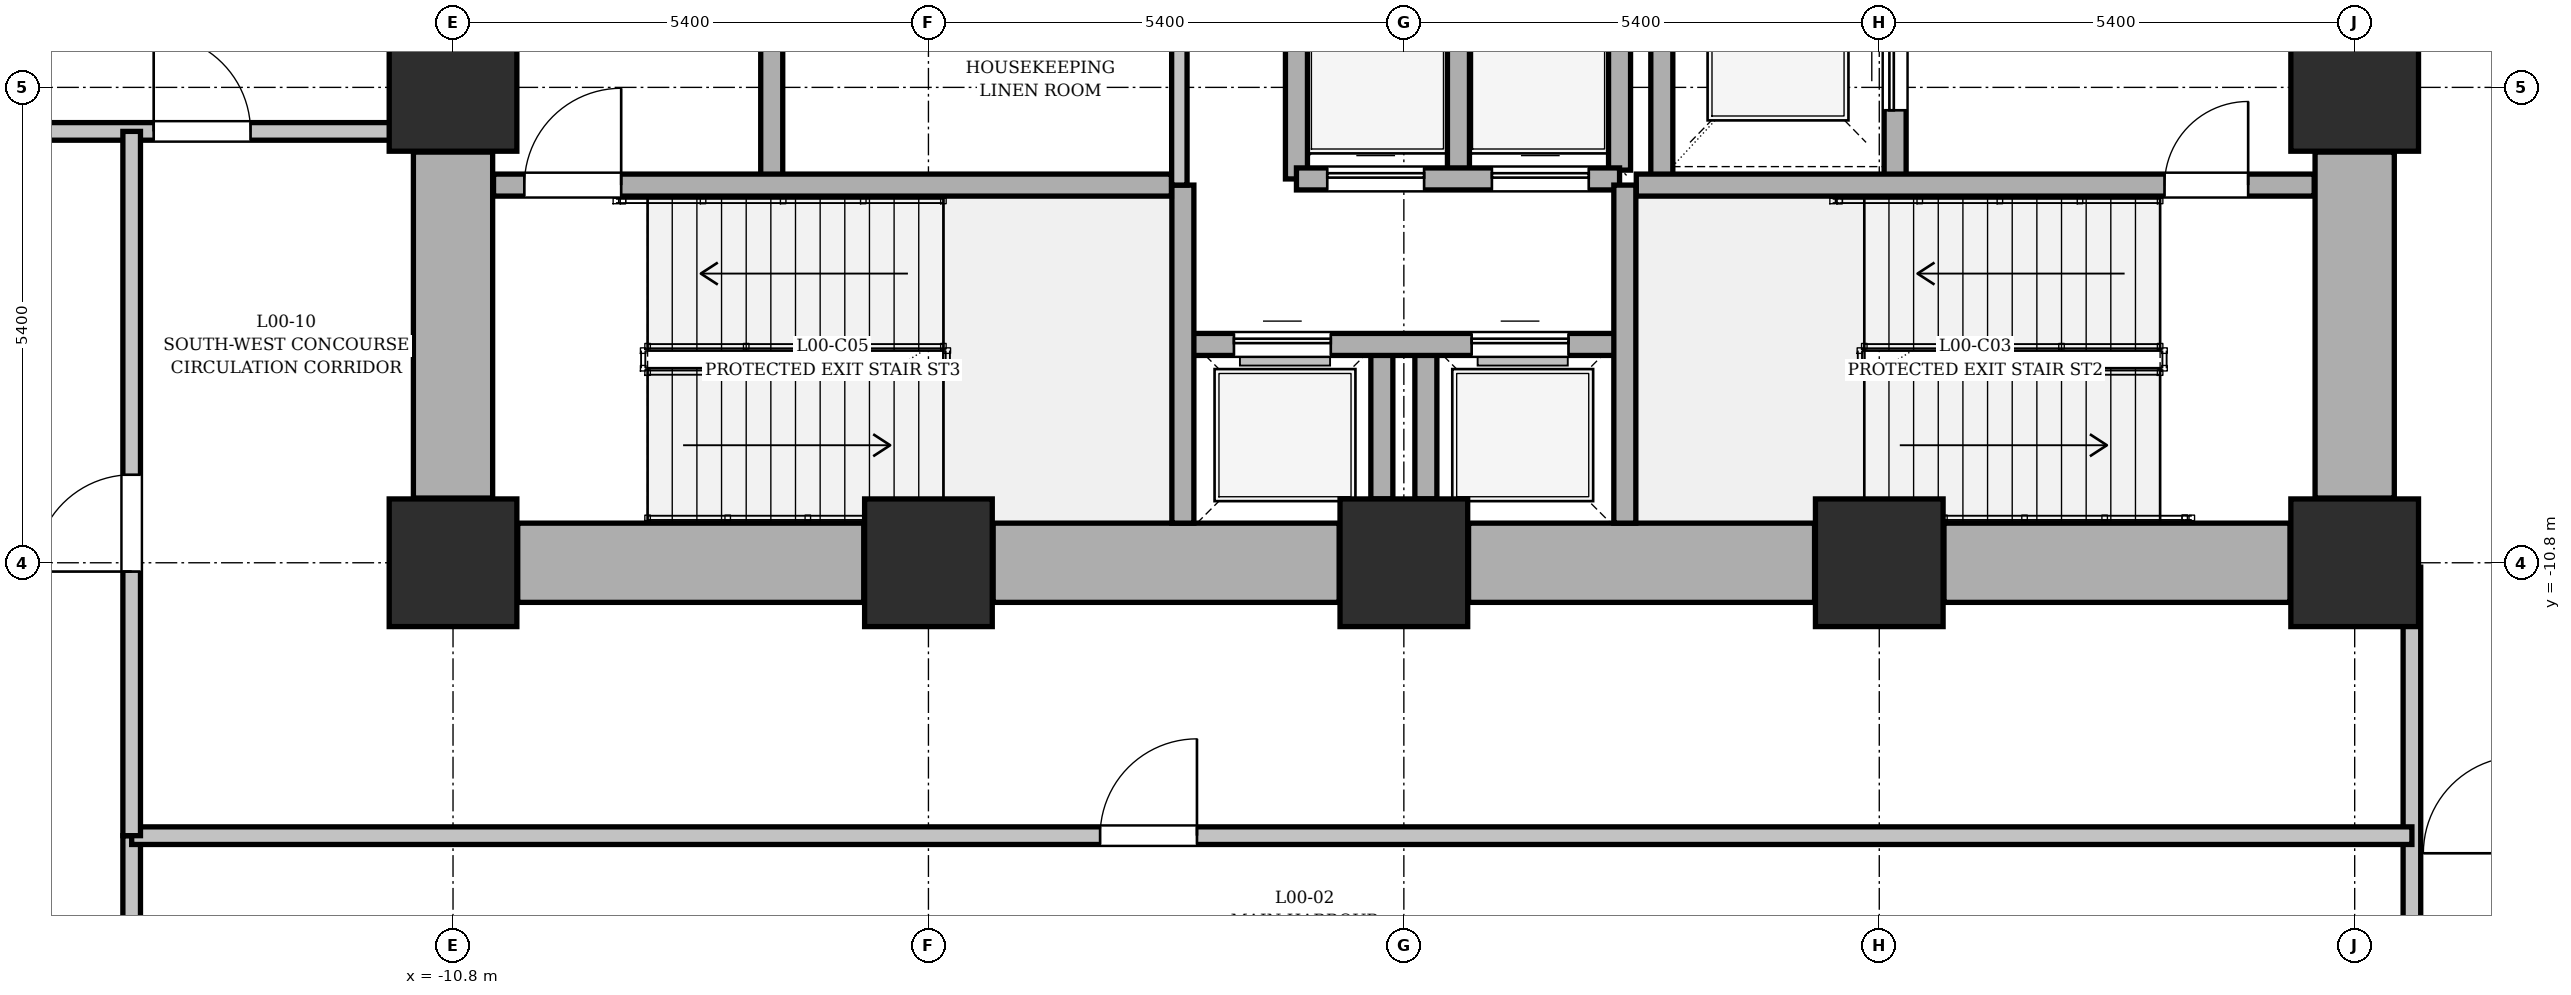
"""IFC4 building model, lengths in metres.
Left out: names, types, materials, properties, quantities, classifications, styles, units other than length and angle.
Written with IfcOpenShell. Run it as: python <this file> out.ifc"""

import sys

from ifc_helpers import new_model, si_unit, direction, frame, frame_2d, origin, origin_2d, place, context, subcontext, project, spatial, rectangle, extrude, element, fill, save


model = new_model("IFC4")
c1 = context("Model", 3, precision=1e-05, world=origin(), true_north=direction((0.0, 1.0)))
c2 = subcontext(c1, "Body", "Model", "MODEL_VIEW")
j1 = project(units=[si_unit("LENGTHUNIT", "METRE"), si_unit("PLANEANGLEUNIT", "RADIAN")], contexts=[c1])
p1 = place(None, origin())
s1 = spatial("IfcSite", under=j1, at=p1, CompositionType="ELEMENT")
p2 = place(p1, origin())
s2 = spatial("IfcBuilding", under=s1, at=p2, CompositionType="ELEMENT")
p3 = place(p2, origin())
s3 = spatial("IfcBuildingStorey", under=s2, at=p3, CompositionType="ELEMENT", Elevation=0.0)
for number, where, z_axis, x_axis in (
    (1, (-10.8, -10.8, 0.0), (0.0, 0.0, 1.0), (1.0, 0.0, 0.0)),
    (2, (-10.8, -5.4, 0.0), (0.0, 0.0, 1.0), (1.0, 0.0, 0.0)),
    (3, (-5.4, -10.8, 0.0), (0.0, 0.0, 1.0), (1.0, 0.0, 0.0)),
    (4, (0.0, -10.8, 0.0), (0.0, 0.0, 1.0), (1.0, 0.0, 0.0)),
    (5, (5.4, -10.8, 0.0), (0.0, 0.0, 1.0), (1.0, 0.0, 0.0)),
    (6, (10.8, -10.8, 0.0), (0.0, 0.0, 1.0), (1.0, 0.0, 0.0)),
    (7, (10.8, -5.4, 0.0), (0.0, 0.0, 1.0), (1.0, 0.0, 0.0)),
):
    element("IfcColumn", number, at=place(p3, frame(where, z_axis=z_axis, x_axis=x_axis)), inside=s3, PredefinedType="COLUMN", context=c2, shape_type="SweptSolid", body=[
        extrude(rectangle(XDim=1.45, YDim=1.45, at=origin_2d()), origin(), (0.0, 0.0, 1.0), 4.5),
    ])
for number, where, z_axis, x_axis in (
    (8, (-10.065, -10.8, 0.0), (0.0, 0.0, 1.0), (1.0, 0.0, 0.0)),
    (9, (-10.8, -10.065, 0.0), (0.0, 0.0, 1.0), (0.0, 1.0, 0.0)),
    (10, (10.8, -10.065, 0.0), (0.0, 0.0, 1.0), (0.0, 1.0, 0.0)),
    (11, (-4.665, -10.8, 0.0), (0.0, 0.0, 1.0), (1.0, 0.0, 0.0)),
    (12, (0.735, -10.8, 0.0), (0.0, 0.0, 1.0), (1.0, 0.0, 0.0)),
    (13, (6.135, -10.8, 0.0), (0.0, 0.0, 1.0), (1.0, 0.0, 0.0)),
):
    element("IfcWall", number, at=place(p3, frame(where, z_axis=z_axis, x_axis=x_axis)), inside=s3, PredefinedType="SHEAR", context=c2, shape_type="SweptSolid", body=[
        extrude(rectangle(XDim=3.93, YDim=0.9, at=frame_2d((1.965, 0.0))), origin(), (0.0, 0.0, 1.0), 4.5),
    ])
p4 = place(p3, frame((2.93, -6.51, 0.0), z_axis=(0.0, 0.0, 1.0), x_axis=(0.0, 1.0, 0.0)))
e14 = element("IfcWall", 14, at=p4, inside=s3, PredefinedType="SHEAR", context=c2, shape_type="SweptSolid", body=[
    extrude(rectangle(XDim=2.79, YDim=0.25, at=frame_2d((1.395, 0.0))), origin(), (0.0, 0.0, 1.0), 4.5),
])
p5 = place(p3, frame((5.58, -6.51, 0.0), z_axis=(0.0, 0.0, 1.0), x_axis=(0.0, 1.0, 0.0)))
e15 = element("IfcWall", 15, at=p5, inside=s3, PredefinedType="SHEAR", context=c2, shape_type="SweptSolid", body=[
    extrude(rectangle(XDim=5.09, YDim=0.25, at=frame_2d((2.545, 0.0))), origin(), (0.0, 0.0, 1.0), 4.5),
])
p6 = place(p5, frame((0.85, 0.0, 0.0)))
e16 = element("IfcOpeningElement", 16, at=p6, cuts=e15, PredefinedType="OPENING", context=c2, shape_type="SweptSolid", body=[
    extrude(rectangle(XDim=1.1, YDim=2.1, at=frame_2d((0.55, 1.05))), frame((0.0, 0.135, 0.0), z_axis=(0.0, -1.0, 0.0), x_axis=(1.0, 0.0, 0.0)), (0.0, 0.0, 1.0), 0.27),
])
for number, where, z_axis, x_axis in (
    (17, (0.62, -6.34, 0.0), (0.0, 0.0, 1.0), (0.0, 1.0, 0.0)),
    (18, (2.45, -6.34, 0.0), (0.0, 0.0, 1.0), (0.0, 1.0, 0.0)),
):
    element("IfcWall", number, at=place(p3, frame(where, z_axis=z_axis, x_axis=x_axis)), inside=s3, PredefinedType="SHEAR", context=c2, shape_type="SweptSolid", body=[
        extrude(rectangle(XDim=1.88, YDim=0.25, at=frame_2d((0.94, 0.0))), origin(), (0.0, 0.0, 1.0), 4.5),
    ])
for number, where, z_axis, x_axis in (
    (19, (-0.25, -10.075, 0.0), (0.0, 0.0, 1.0), (0.0, 1.0, 0.0)),
    (20, (0.25, -10.075, 0.0), (0.0, 0.0, 1.0), (0.0, 1.0, 0.0)),
):
    element("IfcWall", number, at=place(p3, frame(where, z_axis=z_axis, x_axis=x_axis)), inside=s3, PredefinedType="SHEAR", context=c2, shape_type="SweptSolid", body=[
        extrude(rectangle(XDim=1.635, YDim=0.25, at=frame_2d((0.817, 0.0))), origin(), (0.0, 0.0, 1.0), 4.5),
    ])
p7 = place(p3, frame((-1.22, -6.44, 0.0), z_axis=(0.0, 0.0, 1.0), x_axis=(0.0, 1.0, 0.0)))
e21 = element("IfcWall", 21, at=p7, inside=s3, PredefinedType="SHEAR", context=c2, shape_type="SweptSolid", body=[
    extrude(rectangle(XDim=2.08, YDim=0.25, at=frame_2d((1.04, 0.0))), origin(), (0.0, 0.0, 1.0), 4.5),
])
p8 = place(p3, frame((-1.22, -6.44, 0.0), z_axis=(0.0, 0.0, 1.0), x_axis=(1.0, 0.0, 0.0)))
e22 = element("IfcWall", 22, at=p8, inside=s3, PredefinedType="SHEAR", context=c2, shape_type="SweptSolid", body=[
    extrude(rectangle(XDim=3.67, YDim=0.25, at=frame_2d((1.835, 0.0))), origin(), (0.0, 0.0, 1.0), 4.5),
])
p9 = place(p8, frame((0.35, 0.0, 0.0)))
e23 = element("IfcOpeningElement", 23, at=p9, cuts=e22, PredefinedType="OPENING", context=c2, shape_type="SweptSolid", body=[
    extrude(rectangle(XDim=1.1, YDim=2.1, at=frame_2d((0.55, 1.05))), frame((0.0, 0.135, 0.0), z_axis=(0.0, -1.0, 0.0), x_axis=(1.0, 0.0, 0.0)), (0.0, 0.0, 1.0), 0.27),
])
p10 = place(p8, frame((2.22, 0.0, 0.0)))
e24 = element("IfcOpeningElement", 24, at=p10, cuts=e22, PredefinedType="OPENING", context=c2, shape_type="SweptSolid", body=[
    extrude(rectangle(XDim=1.1, YDim=2.1, at=frame_2d((0.55, 1.05))), frame((0.0, 0.135, 0.0), z_axis=(0.0, -1.0, 0.0), x_axis=(1.0, 0.0, 0.0)), (0.0, 0.0, 1.0), 0.27),
])
p11 = place(p3, frame((-2.48, -8.32, 0.0), z_axis=(0.0, 0.0, 1.0), x_axis=(1.0, 0.0, 0.0)))
e25 = element("IfcWall", 25, at=p11, inside=s3, PredefinedType="SHEAR", context=c2, shape_type="SweptSolid", body=[
    extrude(rectangle(XDim=4.93, YDim=0.25, at=frame_2d((2.465, 0.0))), origin(), (0.0, 0.0, 1.0), 4.5),
])
p12 = place(p11, frame((0.55, 0.0, 0.0)))
e26 = element("IfcOpeningElement", 26, at=p12, cuts=e25, PredefinedType="OPENING", context=c2, shape_type="SweptSolid", body=[
    extrude(rectangle(XDim=1.1, YDim=2.1, at=frame_2d((0.55, 1.05))), frame((0.0, 0.135, 0.0), z_axis=(0.0, -1.0, 0.0), x_axis=(1.0, 0.0, 0.0)), (0.0, 0.0, 1.0), 0.27),
])
p13 = place(p11, frame((3.25, 0.0, 0.0)))
e27 = element("IfcOpeningElement", 27, at=p13, cuts=e25, PredefinedType="OPENING", context=c2, shape_type="SweptSolid", body=[
    extrude(rectangle(XDim=1.1, YDim=2.1, at=frame_2d((0.55, 1.05))), frame((0.0, 0.135, 0.0), z_axis=(0.0, -1.0, 0.0), x_axis=(1.0, 0.0, 0.0)), (0.0, 0.0, 1.0), 0.27),
])
p14 = place(p3, frame((2.64, -6.51, 0.0), z_axis=(0.0, 0.0, 1.0), x_axis=(1.0, 0.0, 0.0)))
e28 = element("IfcWall", 28, at=p14, inside=s3, PredefinedType="SHEAR", context=c2, shape_type="SweptSolid", body=[
    extrude(rectangle(XDim=7.7, YDim=0.25, at=frame_2d((3.85, 0.0))), origin(), (0.0, 0.0, 1.0), 4.5),
])
p15 = place(p14, frame((6.0, 0.0, 0.0)))
e29 = element("IfcOpeningElement", 29, at=p15, cuts=e28, PredefinedType="OPENING", context=c2, shape_type="SweptSolid", body=[
    extrude(rectangle(XDim=0.95, YDim=2.1, at=frame_2d((0.475, 1.05))), frame((0.0, 0.135, 0.0), z_axis=(0.0, -1.0, 0.0), x_axis=(1.0, 0.0, 0.0)), (0.0, 0.0, 1.0), 0.27),
])
for number, where, z_axis, x_axis in (
    (30, (2.51, -10.35, 0.0), (0.0, 0.0, 1.0), (0.0, 1.0, 0.0)),
    (31, (-2.51, -10.35, 0.0), (0.0, 0.0, 1.0), (0.0, 1.0, 0.0)),
):
    element("IfcWall", number, at=place(p3, frame(where, z_axis=z_axis, x_axis=x_axis)), inside=s3, PredefinedType="SHEAR", context=c2, shape_type="SweptSolid", body=[
        extrude(rectangle(XDim=3.84, YDim=0.25, at=frame_2d((1.92, 0.0))), origin(), (0.0, 0.0, 1.0), 4.5),
    ])
p16 = place(p3, frame((-7.18, -6.51, 0.0), z_axis=(0.0, 0.0, 1.0), x_axis=(0.0, 1.0, 0.0)))
e32 = element("IfcWall", 32, at=p16, inside=s3, PredefinedType="SHEAR", context=c2, shape_type="SweptSolid", body=[
    extrude(rectangle(XDim=5.09, YDim=0.25, at=frame_2d((2.545, 0.0))), origin(), (0.0, 0.0, 1.0), 4.5),
])
p17 = place(p3, frame((-10.34, -6.51, 0.0), z_axis=(0.0, 0.0, 1.0), x_axis=(1.0, 0.0, 0.0)))
e33 = element("IfcWall", 33, at=p17, inside=s3, PredefinedType="SHEAR", context=c2, shape_type="SweptSolid", body=[
    extrude(rectangle(XDim=7.7, YDim=0.25, at=frame_2d((3.85, 0.0))), origin(), (0.0, 0.0, 1.0), 4.5),
])
p18 = place(p17, frame((0.35, 0.0, 0.0)))
e34 = element("IfcOpeningElement", 34, at=p18, cuts=e33, PredefinedType="OPENING", context=c2, shape_type="SweptSolid", body=[
    extrude(rectangle(XDim=1.1, YDim=2.1, at=frame_2d((0.55, 1.05))), frame((0.0, 0.135, 0.0), z_axis=(0.0, -1.0, 0.0), x_axis=(1.0, 0.0, 0.0)), (0.0, 0.0, 1.0), 0.27),
])
p19 = place(p3, frame((-2.55, -6.51, 0.0), z_axis=(0.0, 0.0, 1.0), x_axis=(0.0, 1.0, 0.0)))
e35 = element("IfcWall", 35, at=p19, inside=s3, PredefinedType="PARTITIONING", context=c2, shape_type="SweptSolid", body=[
    extrude(rectangle(XDim=5.16, YDim=0.175, at=frame_2d((2.58, 0.0))), origin(), (0.0, 0.0, 1.0), 4.2),
])
p20 = place(p19, frame((3.3, 0.0, 0.0)))
e36 = element("IfcOpeningElement", 36, at=p20, cuts=e35, PredefinedType="OPENING", context=c2, shape_type="SweptSolid", body=[
    extrude(rectangle(XDim=0.85, YDim=2.1, at=frame_2d((0.425, 1.05))), frame((0.0, 0.097, 0.0), z_axis=(0.0, -1.0, 0.0), x_axis=(1.0, 0.0, 0.0)), (0.0, 0.0, 1.0), 0.195),
])
p21 = place(p3, frame((11.45, -16.16, 0.0), z_axis=(0.0, 0.0, 1.0), x_axis=(0.0, 1.0, 0.0)))
e37 = element("IfcWall", 37, at=p21, inside=s3, PredefinedType="PARTITIONING", context=c2, shape_type="SweptSolid", body=[
    extrude(rectangle(XDim=5.31, YDim=0.2, at=frame_2d((2.655, 0.0))), origin(), (0.0, 0.0, 1.0), 3.329),
])
p22 = place(p3, frame((-21.56, -5.9, 0.0), z_axis=(0.0, 0.0, 1.0), x_axis=(1.0, 0.0, 0.0)))
e38 = element("IfcWall", 38, at=p22, inside=s3, PredefinedType="PARTITIONING", context=c2, shape_type="SweptSolid", body=[
    extrude(rectangle(XDim=10.71, YDim=0.2, at=frame_2d((5.355, 0.0))), origin(), (0.0, 0.0, 1.0), 3.329),
])
p23 = place(p22, frame((7.36, 0.0, 0.0)))
e39 = element("IfcOpeningElement", 39, at=p23, cuts=e38, PredefinedType="OPENING", context=c2, shape_type="SweptSolid", body=[
    extrude(rectangle(XDim=1.1, YDim=2.1, at=frame_2d((0.55, 1.05))), frame((0.0, 0.11, 0.0), z_axis=(0.0, -1.0, 0.0), x_axis=(1.0, 0.0, 0.0)), (0.0, 0.0, 1.0), 0.22),
])
p24 = place(p3, frame((-14.45, -16.16, 0.0), z_axis=(0.0, 0.0, 1.0), x_axis=(0.0, 1.0, 0.0)))
e40 = element("IfcWall", 40, at=p24, inside=s3, PredefinedType="PARTITIONING", context=c2, shape_type="SweptSolid", body=[
    extrude(rectangle(XDim=2.26, YDim=0.2, at=frame_2d((1.13, 0.0))), origin(), (0.0, 0.0, 1.0), 4.2),
])
p25 = place(p3, frame((-14.45, -13.9, 0.0), z_axis=(0.0, 0.0, 1.0), x_axis=(1.0, 0.0, 0.0)))
e41 = element("IfcWall", 41, at=p25, inside=s3, PredefinedType="PARTITIONING", context=c2, shape_type="SweptSolid", body=[
    extrude(rectangle(XDim=25.9, YDim=0.2, at=frame_2d((12.95, 0.0))), origin(), (0.0, 0.0, 1.0), 3.329),
])
p26 = place(p25, frame((11.0, 0.0, 0.0)))
e42 = element("IfcOpeningElement", 42, at=p26, cuts=e41, PredefinedType="OPENING", context=c2, shape_type="SweptSolid", body=[
    extrude(rectangle(XDim=1.1, YDim=2.1, at=frame_2d((0.55, 1.05))), frame((0.0, 0.11, 0.0), z_axis=(0.0, -1.0, 0.0), x_axis=(1.0, 0.0, 0.0)), (0.0, 0.0, 1.0), 0.22),
])
p27 = place(p3, frame((-14.45, -13.9, 0.0), z_axis=(0.0, 0.0, 1.0), x_axis=(0.0, 1.0, 0.0)))
e43 = element("IfcWall", 43, at=p27, inside=s3, PredefinedType="PARTITIONING", context=c2, shape_type="SweptSolid", body=[
    extrude(rectangle(XDim=8.0, YDim=0.2, at=frame_2d((4.0, 0.0))), origin(), (0.0, 0.0, 1.0), 3.329),
])
p28 = place(p27, frame((3.0, 0.0, 0.0)))
e44 = element("IfcOpeningElement", 44, at=p28, cuts=e43, PredefinedType="OPENING", context=c2, shape_type="SweptSolid", body=[
    extrude(rectangle(XDim=1.1, YDim=2.1, at=frame_2d((0.55, 1.05))), frame((0.0, 0.11, 0.0), z_axis=(0.0, -1.0, 0.0), x_axis=(1.0, 0.0, 0.0)), (0.0, 0.0, 1.0), 0.22),
])
p29 = place(p15, origin())
e45 = element("IfcDoor", 45, at=p29, inside=s3, OperationType="SINGLE_SWING_RIGHT", PredefinedType="DOOR", context=c2, shape_type="SweptSolid", body=[
    extrude(rectangle(XDim=0.95, YDim=2.1, at=frame_2d((0.475, 1.05))), frame((0.0, 0.025, 0.0), z_axis=(0.0, -1.0, 0.0), x_axis=(1.0, 0.0, 0.0)), (0.0, 0.0, 1.0), 0.05),
])
fill(e29, e45)
p30 = place(p18, origin())
e46 = element("IfcDoor", 46, at=p30, inside=s3, OperationType="SINGLE_SWING_RIGHT", PredefinedType="DOOR", context=c2, shape_type="SweptSolid", body=[
    extrude(rectangle(XDim=1.1, YDim=2.1, at=frame_2d((0.55, 1.05))), frame((0.0, 0.025, 0.0), z_axis=(0.0, -1.0, 0.0), x_axis=(1.0, 0.0, 0.0)), (0.0, 0.0, 1.0), 0.05),
])
fill(e34, e46)
p31 = place(p6, origin())
e47 = element("IfcDoor", 47, at=p31, inside=s3, OperationType="SLIDING_TO_RIGHT", PredefinedType="DOOR", context=c2, shape_type="SweptSolid", body=[
    extrude(rectangle(XDim=1.1, YDim=2.1, at=frame_2d((0.55, 1.05))), frame((0.0, 0.025, 0.0), z_axis=(0.0, -1.0, 0.0), x_axis=(1.0, 0.0, 0.0)), (0.0, 0.0, 1.0), 0.05),
])
fill(e16, e47)
p32 = place(p9, origin())
e48 = element("IfcDoor", 48, at=p32, inside=s3, OperationType="SLIDING_TO_LEFT", PredefinedType="DOOR", context=c2, shape_type="SweptSolid", body=[
    extrude(rectangle(XDim=1.1, YDim=2.1, at=frame_2d((0.55, 1.05))), frame((0.0, 0.025, 0.0), z_axis=(0.0, -1.0, 0.0), x_axis=(1.0, 0.0, 0.0)), (0.0, 0.0, 1.0), 0.05),
])
fill(e23, e48)
p33 = place(p10, origin())
e49 = element("IfcDoor", 49, at=p33, inside=s3, OperationType="SLIDING_TO_LEFT", PredefinedType="DOOR", context=c2, shape_type="SweptSolid", body=[
    extrude(rectangle(XDim=1.1, YDim=2.1, at=frame_2d((0.55, 1.05))), frame((0.0, 0.025, 0.0), z_axis=(0.0, -1.0, 0.0), x_axis=(1.0, 0.0, 0.0)), (0.0, 0.0, 1.0), 0.05),
])
fill(e24, e49)
p34 = place(p12, origin())
e50 = element("IfcDoor", 50, at=p34, inside=s3, OperationType="SLIDING_TO_LEFT", PredefinedType="DOOR", context=c2, shape_type="SweptSolid", body=[
    extrude(rectangle(XDim=1.1, YDim=2.1, at=frame_2d((0.55, 1.05))), frame((0.0, 0.025, 0.0), z_axis=(0.0, -1.0, 0.0), x_axis=(1.0, 0.0, 0.0)), (0.0, 0.0, 1.0), 0.05),
])
fill(e26, e50)
p35 = place(p13, origin())
e51 = element("IfcDoor", 51, at=p35, inside=s3, OperationType="SLIDING_TO_LEFT", PredefinedType="DOOR", context=c2, shape_type="SweptSolid", body=[
    extrude(rectangle(XDim=1.1, YDim=2.1, at=frame_2d((0.55, 1.05))), frame((0.0, 0.025, 0.0), z_axis=(0.0, -1.0, 0.0), x_axis=(1.0, 0.0, 0.0)), (0.0, 0.0, 1.0), 0.05),
])
fill(e27, e51)
p36 = place(p23, origin())
e52 = element("IfcDoor", 52, at=p36, inside=s3, OperationType="SINGLE_SWING_LEFT", PredefinedType="DOOR", context=c2, shape_type="SweptSolid", body=[
    extrude(rectangle(XDim=1.1, YDim=2.1, at=frame_2d((0.55, 1.05))), frame((0.0, 0.025, 0.0), z_axis=(0.0, -1.0, 0.0), x_axis=(1.0, 0.0, 0.0)), (0.0, 0.0, 1.0), 0.05),
])
fill(e39, e52)
p37 = place(p26, origin())
e53 = element("IfcDoor", 53, at=p37, inside=s3, OperationType="SINGLE_SWING_RIGHT", PredefinedType="DOOR", context=c2, shape_type="SweptSolid", body=[
    extrude(rectangle(XDim=1.1, YDim=2.1, at=frame_2d((0.55, 1.05))), frame((0.0, 0.025, 0.0), z_axis=(0.0, -1.0, 0.0), x_axis=(1.0, 0.0, 0.0)), (0.0, 0.0, 1.0), 0.05),
])
fill(e42, e53)
p38 = place(p28, origin())
e54 = element("IfcDoor", 54, at=p38, inside=s3, OperationType="SINGLE_SWING_LEFT", PredefinedType="DOOR", context=c2, shape_type="SweptSolid", body=[
    extrude(rectangle(XDim=1.1, YDim=2.1, at=frame_2d((0.55, 1.05))), frame((0.0, 0.025, 0.0), z_axis=(0.0, -1.0, 0.0), x_axis=(1.0, 0.0, 0.0)), (0.0, 0.0, 1.0), 0.05),
])
fill(e44, e54)
save(model, sys.argv[1])
